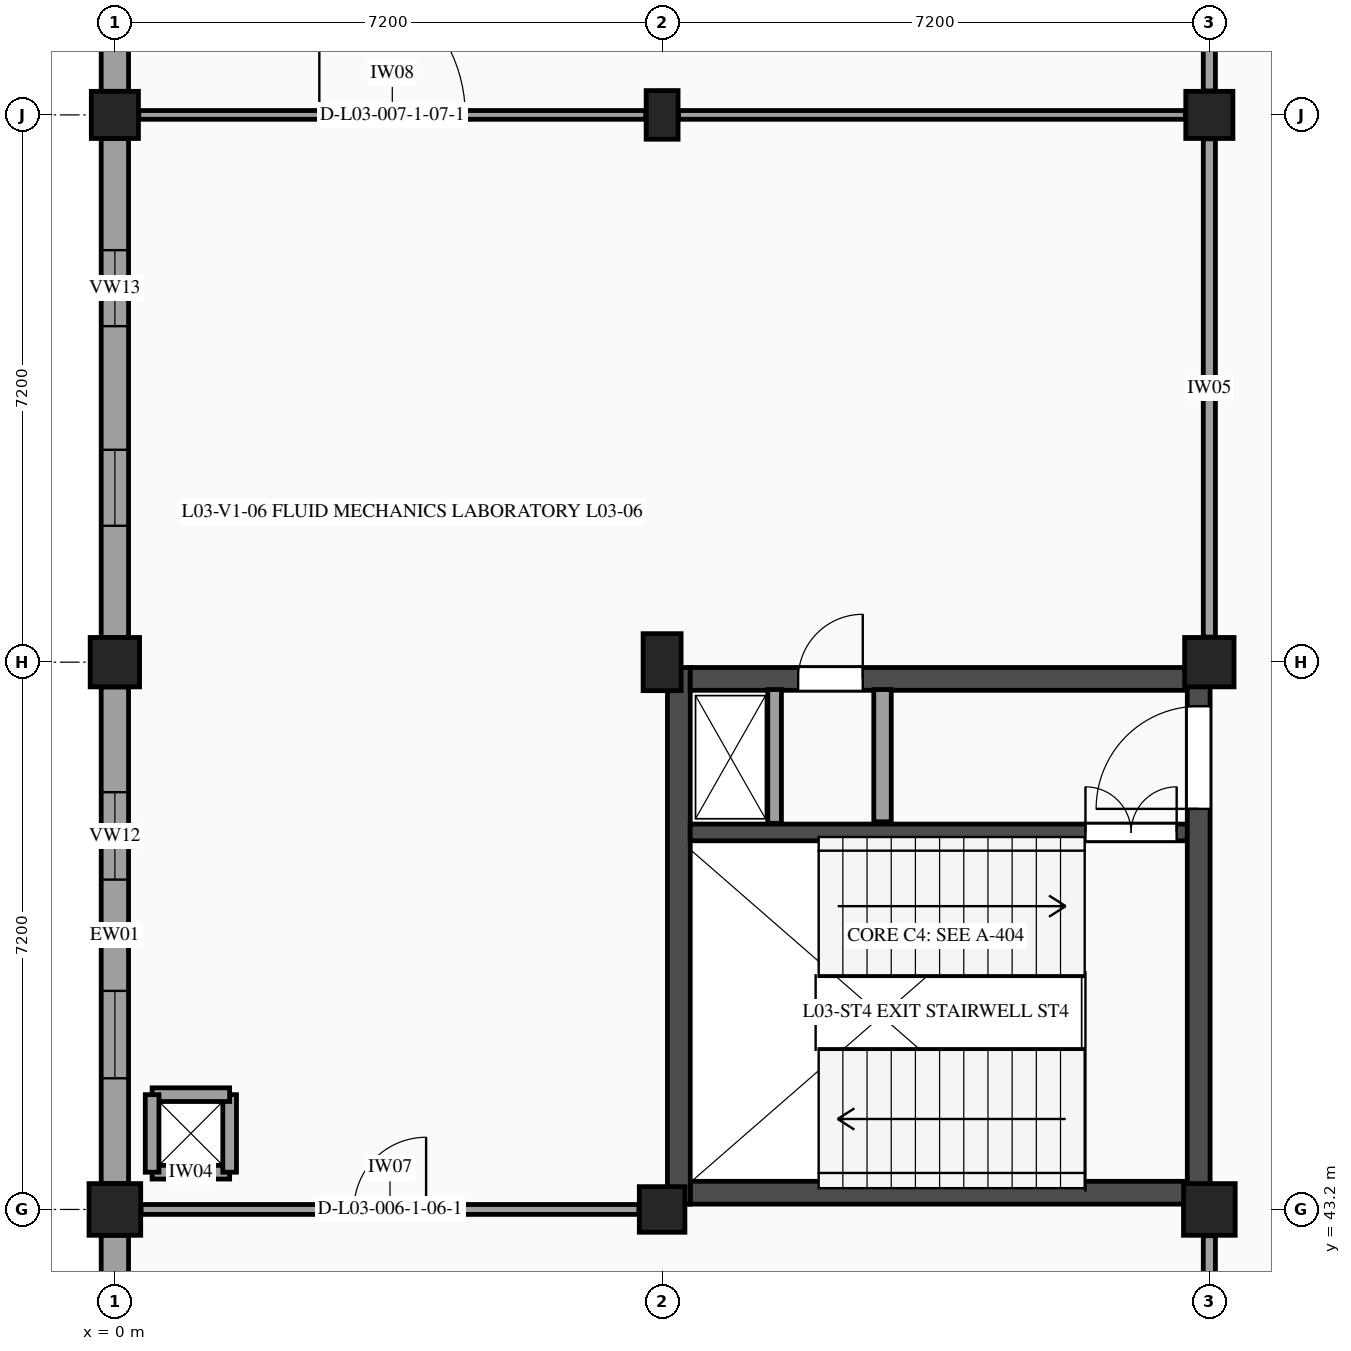
"""IFC4 building model, lengths in metres.
Left out: names, types, materials, properties, quantities, classifications, styles, units other than length and angle.
Written with IfcOpenShell. Run it as: python <this file> out.ifc"""

import sys

from ifc_helpers import new_model, si_unit, direction, frame, frame_2d, origin, origin_2d, place, context, subcontext, project, spatial, rectangle, extrude, element, fill, save


model = new_model("IFC4")
c1 = context("Model", 3, precision=1e-05, world=origin(), true_north=direction((0.0, 1.0)))
c2 = subcontext(c1, "Body", "Model", "MODEL_VIEW")
j1 = project(units=[si_unit("LENGTHUNIT", "METRE"), si_unit("PLANEANGLEUNIT", "RADIAN")], contexts=[c1])
p1 = place(None, origin())
s1 = spatial("IfcSite", under=j1, at=p1, CompositionType="ELEMENT")
p2 = place(p1, origin())
s2 = spatial("IfcBuilding", under=s1, at=p2, CompositionType="ELEMENT")
p3 = place(p2, frame((0.0, 0.0, 14.4)))
s3 = spatial("IfcBuildingStorey", under=s2, at=p3, CompositionType="ELEMENT", Elevation=14.4)
p4 = place(p3, frame((0.0, 43.2, 0.0), z_axis=(0.0, 0.0, 1.0), x_axis=(1.0, 0.0, 0.0)))
e1 = element("IfcColumn", 1, at=p4, inside=s3, PredefinedType="COLUMN", context=c2, shape_type="SweptSolid", body=[
    extrude(rectangle(XDim=0.68, YDim=0.68, at=origin_2d()), origin(), (0.0, 0.0, 1.0), 4.2),
])
p5 = place(p3, frame((0.0, 50.4, 0.0), z_axis=(0.0, 0.0, 1.0), x_axis=(1.0, 0.0, 0.0)))
e2 = element("IfcColumn", 2, at=p5, inside=s3, PredefinedType="COLUMN", context=c2, shape_type="SweptSolid", body=[
    extrude(rectangle(XDim=0.65, YDim=0.65, at=origin_2d()), origin(), (0.0, 0.0, 1.0), 4.2),
])
p6 = place(p3, frame((0.0, 57.6, 0.0), z_axis=(0.0, 0.0, 1.0), x_axis=(1.0, 0.0, 0.0)))
e3 = element("IfcColumn", 3, at=p6, inside=s3, PredefinedType="COLUMN", context=c2, shape_type="SweptSolid", body=[
    extrude(rectangle(XDim=0.62, YDim=0.62, at=origin_2d()), origin(), (0.0, 0.0, 1.0), 4.2),
])
p7 = place(p3, frame((7.2, 43.2, 0.0), z_axis=(0.0, 0.0, 1.0), x_axis=(1.0, 0.0, 0.0)))
e4 = element("IfcColumn", 4, at=p7, inside=s3, PredefinedType="COLUMN", context=c2, shape_type="SweptSolid", body=[
    extrude(rectangle(XDim=0.6, YDim=0.6, at=origin_2d()), origin(), (0.0, 0.0, 1.0), 4.2),
])
p8 = place(p3, frame((7.2, 50.4, 0.0), z_axis=(0.0, 0.0, 1.0), x_axis=(1.0, 0.0, 0.0)))
e5 = element("IfcColumn", 5, at=p8, inside=s3, PredefinedType="COLUMN", context=c2, shape_type="SweptSolid", body=[
    extrude(rectangle(XDim=0.5, YDim=0.75, at=origin_2d()), origin(), (0.0, 0.0, 1.0), 4.2),
])
p9 = place(p3, frame((7.2, 57.6, 0.0), z_axis=(0.0, 0.0, 1.0), x_axis=(1.0, 0.0, 0.0)))
e6 = element("IfcColumn", 6, at=p9, inside=s3, PredefinedType="PILASTER", context=c2, shape_type="SweptSolid", body=[
    extrude(rectangle(XDim=0.42, YDim=0.64, at=origin_2d()), origin(), (0.0, 0.0, 1.0), 4.2),
])
p10 = place(p3, frame((14.4, 43.2, 0.0), z_axis=(0.0, 0.0, 1.0), x_axis=(1.0, 0.0, 0.0)))
e7 = element("IfcColumn", 7, at=p10, inside=s3, PredefinedType="COLUMN", context=c2, shape_type="SweptSolid", body=[
    extrude(rectangle(XDim=0.68, YDim=0.68, at=origin_2d()), origin(), (0.0, 0.0, 1.0), 4.2),
])
p11 = place(p3, frame((14.4, 50.4, 0.0), z_axis=(0.0, 0.0, 1.0), x_axis=(1.0, 0.0, 0.0)))
e8 = element("IfcColumn", 8, at=p11, inside=s3, PredefinedType="COLUMN", context=c2, shape_type="SweptSolid", body=[
    extrude(rectangle(XDim=0.65, YDim=0.65, at=origin_2d()), origin(), (0.0, 0.0, 1.0), 4.2),
])
p12 = place(p3, frame((14.4, 57.6, 0.0), z_axis=(0.0, 0.0, 1.0), x_axis=(1.0, 0.0, 0.0)))
e9 = element("IfcColumn", 9, at=p12, inside=s3, PredefinedType="COLUMN", context=c2, shape_type="SweptSolid", body=[
    extrude(rectangle(XDim=0.62, YDim=0.62, at=origin_2d()), origin(), (0.0, 0.0, 1.0), 4.2),
])
p13 = place(p3, frame((0.0, 36.32, 0.0), z_axis=(0.0, 0.0, 1.0), x_axis=(0.0, 1.0, 0.0)))
e10 = element("IfcWall", 10, at=p13, inside=s3, PredefinedType="STANDARD", context=c2, shape_type="SweptSolid", body=[
    extrude(rectangle(XDim=6.54, YDim=0.36, at=frame_2d((3.27, 0.0))), origin(), (0.0, 0.0, 1.0), 3.135),
])
p14 = place(p13, frame((1.337, 0.0, 1.15)))
e11 = element("IfcOpeningElement", 11, at=p14, cuts=e10, PredefinedType="OPENING", context=c2, shape_type="SweptSolid", body=[
    extrude(rectangle(XDim=1.25, YDim=1.25, at=frame_2d((0.625, 0.625))), frame((0.0, 0.19, 0.0), z_axis=(0.0, -1.0, 0.0), x_axis=(1.0, 0.0, 0.0)), (0.0, 0.0, 1.0), 0.38),
])
p15 = place(p13, frame((3.953, 0.0, 1.15)))
e12 = element("IfcOpeningElement", 12, at=p15, cuts=e10, PredefinedType="OPENING", context=c2, shape_type="SweptSolid", body=[
    extrude(rectangle(XDim=1.25, YDim=1.25, at=frame_2d((0.625, 0.625))), frame((0.0, 0.19, 0.0), z_axis=(0.0, -1.0, 0.0), x_axis=(1.0, 0.0, 0.0)), (0.0, 0.0, 1.0), 0.38),
])
p16 = place(p3, frame((0.0, 43.54, 0.0), z_axis=(0.0, 0.0, 1.0), x_axis=(0.0, 1.0, 0.0)))
e13 = element("IfcWall", 13, at=p16, inside=s3, PredefinedType="STANDARD", context=c2, shape_type="SweptSolid", body=[
    extrude(rectangle(XDim=6.535, YDim=0.36, at=frame_2d((3.268, 0.0))), origin(), (0.0, 0.0, 1.0), 3.135),
])
p17 = place(p16, frame((1.385, 0.0, 1.15)))
e14 = element("IfcOpeningElement", 14, at=p17, cuts=e13, PredefinedType="OPENING", context=c2, shape_type="SweptSolid", body=[
    extrude(rectangle(XDim=1.15, YDim=1.2, at=frame_2d((0.575, 0.6))), frame((0.0, 0.19, 0.0), z_axis=(0.0, -1.0, 0.0), x_axis=(1.0, 0.0, 0.0)), (0.0, 0.0, 1.0), 0.38),
])
p18 = place(p16, frame((4.0, 0.0, 1.15)))
e15 = element("IfcOpeningElement", 15, at=p18, cuts=e13, PredefinedType="OPENING", context=c2, shape_type="SweptSolid", body=[
    extrude(rectangle(XDim=1.15, YDim=1.2, at=frame_2d((0.575, 0.6))), frame((0.0, 0.19, 0.0), z_axis=(0.0, -1.0, 0.0), x_axis=(1.0, 0.0, 0.0)), (0.0, 0.0, 1.0), 0.38),
])
p19 = place(p3, frame((0.0, 50.725, 0.0), z_axis=(0.0, 0.0, 1.0), x_axis=(0.0, 1.0, 0.0)))
e16 = element("IfcWall", 16, at=p19, inside=s3, PredefinedType="STANDARD", context=c2, shape_type="SweptSolid", body=[
    extrude(rectangle(XDim=6.565, YDim=0.36, at=frame_2d((3.282, 0.0))), origin(), (0.0, 0.0, 1.0), 3.135),
])
p20 = place(p19, frame((1.469, 0.0, 1.15)))
e17 = element("IfcOpeningElement", 17, at=p20, cuts=e16, PredefinedType="OPENING", context=c2, shape_type="SweptSolid", body=[
    extrude(rectangle(XDim=1.0, YDim=1.2, at=frame_2d((0.5, 0.6))), frame((0.0, 0.19, 0.0), z_axis=(0.0, -1.0, 0.0), x_axis=(1.0, 0.0, 0.0)), (0.0, 0.0, 1.0), 0.38),
])
p21 = place(p19, frame((4.095, 0.0, 1.15)))
e18 = element("IfcOpeningElement", 18, at=p21, cuts=e16, PredefinedType="OPENING", context=c2, shape_type="SweptSolid", body=[
    extrude(rectangle(XDim=1.0, YDim=1.2, at=frame_2d((0.5, 0.6))), frame((0.0, 0.19, 0.0), z_axis=(0.0, -1.0, 0.0), x_axis=(1.0, 0.0, 0.0)), (0.0, 0.0, 1.0), 0.38),
])
p22 = place(p3, frame((0.0, 57.91, 0.0), z_axis=(0.0, 0.0, 1.0), x_axis=(0.0, 1.0, 0.0)))
e19 = element("IfcWall", 19, at=p22, inside=s3, PredefinedType="STANDARD", context=c2, shape_type="SweptSolid", body=[
    extrude(rectangle(XDim=6.59, YDim=0.36, at=frame_2d((3.295, 0.0))), origin(), (0.0, 0.0, 1.0), 3.135),
])
p23 = place(p22, frame((1.552, 0.0, 1.15)))
e20 = element("IfcOpeningElement", 20, at=p23, cuts=e19, PredefinedType="OPENING", context=c2, shape_type="SweptSolid", body=[
    extrude(rectangle(XDim=0.85, YDim=1.25, at=frame_2d((0.425, 0.625))), frame((0.0, 0.19, 0.0), z_axis=(0.0, -1.0, 0.0), x_axis=(1.0, 0.0, 0.0)), (0.0, 0.0, 1.0), 0.38),
])
p24 = place(p22, frame((4.188, 0.0, 1.15)))
e21 = element("IfcOpeningElement", 21, at=p24, cuts=e19, PredefinedType="OPENING", context=c2, shape_type="SweptSolid", body=[
    extrude(rectangle(XDim=0.85, YDim=1.25, at=frame_2d((0.425, 0.625))), frame((0.0, 0.19, 0.0), z_axis=(0.0, -1.0, 0.0), x_axis=(1.0, 0.0, 0.0)), (0.0, 0.0, 1.0), 0.38),
])
p25 = place(p3, frame((7.57, 43.42, 0.0), z_axis=(0.0, 0.0, 1.0), x_axis=(1.0, 0.0, 0.0)))
e22 = element("IfcWall", 22, at=p25, inside=s3, PredefinedType="SHEAR", context=c2, shape_type="SweptSolid", body=[
    extrude(rectangle(XDim=6.54, YDim=0.3, at=frame_2d((3.27, 0.0))), origin(), (0.0, 0.0, 1.0), 3.94),
])
p26 = place(p3, frame((7.42, 50.33, 0.0), z_axis=(0.0, 0.0, 1.0), x_axis=(0.0, -1.0, 0.0)))
e23 = element("IfcWall", 23, at=p26, inside=s3, PredefinedType="SHEAR", context=c2, shape_type="SweptSolid", body=[
    extrude(rectangle(XDim=7.06, YDim=0.3, at=frame_2d((3.53, 0.0))), origin(), (0.0, 0.0, 1.0), 3.94),
])
p27 = place(p3, frame((7.57, 50.18, 0.0), z_axis=(0.0, 0.0, 1.0), x_axis=(1.0, 0.0, 0.0)))
e24 = element("IfcWall", 24, at=p27, inside=s3, PredefinedType="SHEAR", context=c2, shape_type="SweptSolid", body=[
    extrude(rectangle(XDim=6.54, YDim=0.3, at=frame_2d((3.27, 0.0))), origin(), (0.0, 0.0, 1.0), 3.94),
])
p28 = place(p27, frame((1.42, 0.0, 0.0)))
e25 = element("IfcOpeningElement", 25, at=p28, cuts=e24, PredefinedType="OPENING", context=c2, shape_type="SweptSolid", body=[
    extrude(rectangle(XDim=0.85, YDim=2.1, at=frame_2d((0.425, 1.05))), frame((0.0, 0.16, 0.0), z_axis=(0.0, -1.0, 0.0), x_axis=(1.0, 0.0, 0.0)), (0.0, 0.0, 1.0), 0.32),
])
p29 = place(p3, frame((7.57, 48.16, 0.0), z_axis=(0.0, 0.0, 1.0), x_axis=(1.0, 0.0, 0.0)))
e26 = element("IfcWall", 26, at=p29, inside=s3, PredefinedType="SHEAR", context=c2, shape_type="SweptSolid", body=[
    extrude(rectangle(XDim=6.54, YDim=0.22, at=frame_2d((3.27, 0.0))), origin(), (0.0, 0.0, 1.0), 3.94),
])
p30 = place(p29, frame((5.2, 0.0, 0.0)))
e27 = element("IfcOpeningElement", 27, at=p30, cuts=e26, PredefinedType="OPENING", context=c2, shape_type="SweptSolid", body=[
    extrude(rectangle(XDim=1.2, YDim=2.2, at=frame_2d((0.6, 1.1))), frame((0.0, 0.12, 0.0), z_axis=(0.0, -1.0, 0.0), x_axis=(1.0, 0.0, 0.0)), (0.0, 0.0, 1.0), 0.24),
])
p31 = place(p3, frame((10.1, 48.3, 0.0), z_axis=(0.0, 0.0, 1.0), x_axis=(0.0, 1.0, 0.0)))
e28 = element("IfcWall", 28, at=p31, inside=s3, PredefinedType="PARTITIONING", context=c2, shape_type="SweptSolid", body=[
    extrude(rectangle(XDim=1.74, YDim=0.23, at=frame_2d((0.87, 0.0))), origin(), (0.0, 0.0, 1.0), 3.94),
])
p32 = place(p3, frame((8.68, 48.28, 0.0), z_axis=(0.0, 0.0, 1.0), x_axis=(0.0, 1.0, 0.0)))
e29 = element("IfcWall", 29, at=p32, inside=s3, PredefinedType="PARTITIONING", context=c2, shape_type="SweptSolid", body=[
    extrude(rectangle(XDim=1.76, YDim=0.18, at=frame_2d((0.88, 0.0))), origin(), (0.0, 0.0, 1.0), 3.94),
])
p33 = place(p3, frame((14.26, 43.27, 0.0), z_axis=(0.0, 0.0, 1.0), x_axis=(0.0, 1.0, 0.0)))
e30 = element("IfcWall", 30, at=p33, inside=s3, PredefinedType="SHEAR", context=c2, shape_type="SweptSolid", body=[
    extrude(rectangle(XDim=7.06, YDim=0.3, at=frame_2d((3.53, 0.0))), origin(), (0.0, 0.0, 1.0), 3.94),
])
p34 = place(p33, frame((5.2, 0.0, 0.0)))
e31 = element("IfcOpeningElement", 31, at=p34, cuts=e30, PredefinedType="OPENING", context=c2, shape_type="SweptSolid", body=[
    extrude(rectangle(XDim=1.35, YDim=2.15, at=frame_2d((0.675, 1.075))), frame((0.0, 0.16, 0.0), z_axis=(0.0, -1.0, 0.0), x_axis=(1.0, 0.0, 0.0)), (0.0, 0.0, 1.0), 0.32),
])
for number, where, z_axis, x_axis in (
    (32, (0.49, 43.69, 0.0), (0.0, 0.0, 1.0), (1.0, 0.0, 0.0)),
    (33, (1.51, 43.69, 0.0), (0.0, 0.0, 1.0), (0.0, 1.0, 0.0)),
    (34, (1.51, 44.71, 0.0), (0.0, 0.0, 1.0), (-1.0, 0.0, 0.0)),
    (35, (0.49, 44.71, 0.0), (0.0, 0.0, 1.0), (0.0, -1.0, 0.0)),
):
    element("IfcWall", number, at=place(p3, frame(where, z_axis=z_axis, x_axis=x_axis)), inside=s3, PredefinedType="PARTITIONING", context=c2, shape_type="SweptSolid", body=[
        extrude(rectangle(XDim=1.02, YDim=0.18, at=frame_2d((0.51, 0.0))), origin(), (0.0, 0.0, 1.0), 3.94),
    ])
p35 = place(p3, frame((0.345, 43.2, 0.0), z_axis=(0.0, 0.0, 1.0), x_axis=(1.0, 0.0, 0.0)))
e36 = element("IfcWall", 36, at=p35, inside=s3, PredefinedType="PARTITIONING", context=c2, shape_type="SweptSolid", body=[
    extrude(rectangle(XDim=6.55, YDim=0.13, at=frame_2d((3.275, 0.0))), origin(), (0.0, 0.0, 1.0), 3.215),
])
p36 = place(p35, frame((2.8, 0.0, 0.0)))
e37 = element("IfcOpeningElement", 37, at=p36, cuts=e36, PredefinedType="OPENING", context=c2, shape_type="SweptSolid", body=[
    extrude(rectangle(XDim=0.95, YDim=2.15, at=frame_2d((0.475, 1.075))), frame((0.0, 0.075, 0.0), z_axis=(0.0, -1.0, 0.0), x_axis=(1.0, 0.0, 0.0)), (0.0, 0.0, 1.0), 0.15),
])
p37 = place(p3, frame((0.315, 57.6, 0.0), z_axis=(0.0, 0.0, 1.0), x_axis=(1.0, 0.0, 0.0)))
e38 = element("IfcWall", 38, at=p37, inside=s3, PredefinedType="PARTITIONING", context=c2, shape_type="SweptSolid", body=[
    extrude(rectangle(XDim=6.67, YDim=0.115, at=frame_2d((3.335, 0.0))), origin(), (0.0, 0.0, 1.0), 3.215),
])
p38 = place(p37, frame((2.375, 0.0, 0.0)))
e39 = element("IfcOpeningElement", 39, at=p38, cuts=e38, PredefinedType="OPENING", context=c2, shape_type="SweptSolid", body=[
    extrude(rectangle(XDim=1.92, YDim=2.35, at=frame_2d((0.96, 1.175))), frame((0.0, 0.067, 0.0), z_axis=(0.0, -1.0, 0.0), x_axis=(1.0, 0.0, 0.0)), (0.0, 0.0, 1.0), 0.135),
])
p39 = place(p3, frame((14.4, 36.325, 0.0), z_axis=(0.0, 0.0, 1.0), x_axis=(0.0, 1.0, 0.0)))
e40 = element("IfcWall", 40, at=p39, inside=s3, PredefinedType="PARTITIONING", context=c2, shape_type="SweptSolid", body=[
    extrude(rectangle(XDim=6.53, YDim=0.16, at=frame_2d((3.265, 0.0))), origin(), (0.0, 0.0, 1.0), 3.255),
])
p40 = place(p3, frame((14.4, 50.73, 0.0), z_axis=(0.0, 0.0, 1.0), x_axis=(0.0, 1.0, 0.0)))
e41 = element("IfcWall", 41, at=p40, inside=s3, PredefinedType="PARTITIONING", context=c2, shape_type="SweptSolid", body=[
    extrude(rectangle(XDim=6.555, YDim=0.16, at=frame_2d((3.277, 0.0))), origin(), (0.0, 0.0, 1.0), 3.25),
])
p41 = place(p3, frame((7.415, 57.6, 0.0), z_axis=(0.0, 0.0, 1.0), x_axis=(1.0, 0.0, 0.0)))
e42 = element("IfcWall", 42, at=p41, inside=s3, PredefinedType="PARTITIONING", context=c2, shape_type="SweptSolid", body=[
    extrude(rectangle(XDim=6.67, YDim=0.115, at=frame_2d((3.335, 0.0))), origin(), (0.0, 0.0, 1.0), 3.22),
])
p42 = place(p3, frame((14.4, 57.915, 0.0), z_axis=(0.0, 0.0, 1.0), x_axis=(0.0, 1.0, 0.0)))
e43 = element("IfcWall", 43, at=p42, inside=s3, PredefinedType="PARTITIONING", context=c2, shape_type="SweptSolid", body=[
    extrude(rectangle(XDim=6.58, YDim=0.16, at=frame_2d((3.29, 0.0))), origin(), (0.0, 0.0, 1.0), 3.245),
])
p43 = place(p17, origin())
e44 = element("IfcWindow", 44, at=p43, inside=s3, PartitioningType="SINGLE_PANEL", PredefinedType="WINDOW", context=c2, shape_type="SweptSolid", body=[
    extrude(rectangle(XDim=1.15, YDim=1.2, at=frame_2d((0.575, 0.6))), frame((0.0, -0.08, 0.0), z_axis=(0.0, -1.0, 0.0), x_axis=(1.0, 0.0, 0.0)), (0.0, 0.0, 1.0), 0.06),
])
fill(e14, e44)
p44 = place(p18, origin())
e45 = element("IfcWindow", 45, at=p44, inside=s3, PartitioningType="SINGLE_PANEL", PredefinedType="WINDOW", context=c2, shape_type="SweptSolid", body=[
    extrude(rectangle(XDim=1.15, YDim=1.2, at=frame_2d((0.575, 0.6))), frame((0.0, -0.08, 0.0), z_axis=(0.0, -1.0, 0.0), x_axis=(1.0, 0.0, 0.0)), (0.0, 0.0, 1.0), 0.06),
])
fill(e15, e45)
p45 = place(p20, origin())
e46 = element("IfcWindow", 46, at=p45, inside=s3, PartitioningType="SINGLE_PANEL", PredefinedType="WINDOW", context=c2, shape_type="SweptSolid", body=[
    extrude(rectangle(XDim=1.0, YDim=1.2, at=frame_2d((0.5, 0.6))), frame((0.0, -0.08, 0.0), z_axis=(0.0, -1.0, 0.0), x_axis=(1.0, 0.0, 0.0)), (0.0, 0.0, 1.0), 0.06),
])
fill(e17, e46)
p46 = place(p21, origin())
e47 = element("IfcWindow", 47, at=p46, inside=s3, PartitioningType="SINGLE_PANEL", PredefinedType="WINDOW", context=c2, shape_type="SweptSolid", body=[
    extrude(rectangle(XDim=1.0, YDim=1.2, at=frame_2d((0.5, 0.6))), frame((0.0, -0.08, 0.0), z_axis=(0.0, -1.0, 0.0), x_axis=(1.0, 0.0, 0.0)), (0.0, 0.0, 1.0), 0.06),
])
fill(e18, e47)
p47 = place(p28, origin())
e48 = element("IfcDoor", 48, at=p47, inside=s3, OperationType="SINGLE_SWING_RIGHT", PredefinedType="DOOR", context=c2, shape_type="SweptSolid", body=[
    extrude(rectangle(XDim=0.85, YDim=2.1, at=frame_2d((0.425, 1.05))), frame((0.0, 0.025, 0.0), z_axis=(0.0, -1.0, 0.0), x_axis=(1.0, 0.0, 0.0)), (0.0, 0.0, 1.0), 0.05),
])
fill(e25, e48)
p48 = place(p30, origin())
e49 = element("IfcDoor", 49, at=p48, inside=s3, OperationType="DOUBLE_DOOR_SINGLE_SWING", PredefinedType="DOOR", context=c2, shape_type="SweptSolid", body=[
    extrude(rectangle(XDim=1.2, YDim=2.2, at=frame_2d((0.6, 1.1))), frame((0.0, 0.025, 0.0), z_axis=(0.0, -1.0, 0.0), x_axis=(1.0, 0.0, 0.0)), (0.0, 0.0, 1.0), 0.05),
])
fill(e27, e49)
p49 = place(p34, origin())
e50 = element("IfcDoor", 50, at=p49, inside=s3, OperationType="SINGLE_SWING_LEFT", PredefinedType="DOOR", context=c2, shape_type="SweptSolid", body=[
    extrude(rectangle(XDim=1.35, YDim=2.15, at=frame_2d((0.675, 1.075))), frame((0.0, 0.025, 0.0), z_axis=(0.0, -1.0, 0.0), x_axis=(1.0, 0.0, 0.0)), (0.0, 0.0, 1.0), 0.05),
])
fill(e31, e50)
p50 = place(p36, origin())
e51 = element("IfcDoor", 51, at=p50, inside=s3, OperationType="SINGLE_SWING_RIGHT", PredefinedType="DOOR", context=c2, shape_type="SweptSolid", body=[
    extrude(rectangle(XDim=0.95, YDim=2.15, at=frame_2d((0.475, 1.075))), frame((0.0, 0.025, 0.0), z_axis=(0.0, -1.0, 0.0), x_axis=(1.0, 0.0, 0.0)), (0.0, 0.0, 1.0), 0.05),
])
fill(e37, e51)
p51 = place(p38, origin())
e52 = element("IfcDoor", 52, at=p51, inside=s3, OperationType="SINGLE_SWING_LEFT", PredefinedType="DOOR", context=c2, shape_type="SweptSolid", body=[
    extrude(rectangle(XDim=1.92, YDim=2.35, at=frame_2d((0.96, 1.175))), frame((0.0, 0.025, 0.0), z_axis=(0.0, -1.0, 0.0), x_axis=(1.0, 0.0, 0.0)), (0.0, 0.0, 1.0), 0.05),
])
fill(e39, e52)
save(model, sys.argv[1])
